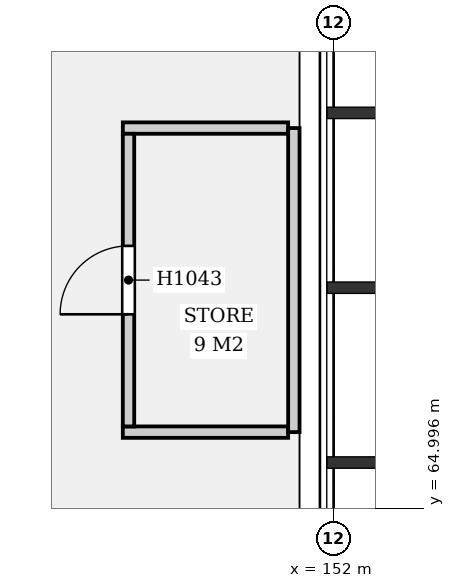
"""IFC4 building model, lengths in metres.
Left out: names, types, materials, properties, quantities, classifications, styles, units other than length and angle.
Written with IfcOpenShell. Run it as: python <this file> out.ifc"""

import sys

from ifc_helpers import new_model, si_unit, direction, frame, frame_2d, origin, place, context, subcontext, project, spatial, rectangle, extrude, element, fill, save


model = new_model("IFC4")
c1 = context("Model", 3, precision=1e-05, world=origin(), true_north=direction((0.0, 1.0)))
c2 = subcontext(c1, "Body", "Model", "MODEL_VIEW")
j1 = project(units=[si_unit("LENGTHUNIT", "METRE"), si_unit("PLANEANGLEUNIT", "RADIAN")], contexts=[c1])
p1 = place(None, origin())
s1 = spatial("IfcSite", under=j1, at=p1, CompositionType="ELEMENT")
p2 = place(p1, origin())
s2 = spatial("IfcBuilding", under=s1, at=p2, CompositionType="ELEMENT")
p3 = place(p2, frame((0.0, 0.0, 5.0)))
s3 = spatial("IfcBuildingStorey", under=s2, at=p3, CompositionType="ELEMENT", Elevation=5.0)
p4 = place(p3, frame((149.3, 66.075, 0.0), z_axis=(0.0, 0.0, 1.0), x_axis=(0.0, 1.0, 0.0)))
e1 = element("IfcWall", 1, at=p4, inside=s3, PredefinedType="PARTITIONING", context=c2, shape_type="SweptSolid", body=[
    extrude(rectangle(XDim=3.85, YDim=0.15, at=frame_2d((1.925, 0.0))), origin(), (0.0, 0.0, 1.0), 4.15),
])
p5 = place(p4, frame((1.475, 0.0, 0.0)))
e2 = element("IfcOpeningElement", 2, at=p5, cuts=e1, PredefinedType="OPENING", context=c2, shape_type="SweptSolid", body=[
    extrude(rectangle(XDim=0.9, YDim=2.1, at=frame_2d((0.45, 1.05))), frame((0.0, 0.085, 0.0), z_axis=(0.0, -1.0, 0.0), x_axis=(1.0, 0.0, 0.0)), (0.0, 0.0, 1.0), 0.17),
])
for number, where, z_axis, x_axis in (
    (3, (151.4, 66.0, 0.0), (0.0, 0.0, 1.0), (-1.0, 0.0, 0.0)),
    (4, (151.4, 70.0, 0.0), (0.0, 0.0, 1.0), (-1.0, 0.0, 0.0)),
):
    element("IfcWall", number, at=place(p3, frame(where, z_axis=z_axis, x_axis=x_axis)), inside=s3, PredefinedType="PARTITIONING", context=c2, shape_type="SweptSolid", body=[
        extrude(rectangle(XDim=2.175, YDim=0.15, at=frame_2d((1.087, 0.0))), origin(), (0.0, 0.0, 1.0), 4.15),
    ])
p6 = place(p3, frame((151.475, 66.0, 0.0), z_axis=(0.0, 0.0, 1.0), x_axis=(0.0, 1.0, 0.0)))
e5 = element("IfcWall", 5, at=p6, inside=s3, PredefinedType="PARTITIONING", context=c2, shape_type="SweptSolid", body=[
    extrude(rectangle(XDim=4.0, YDim=0.15, at=frame_2d((2.0, 0.0))), origin(), (0.0, 0.0, 1.0), 4.15),
])
p7 = place(p5, origin())
e6 = element("IfcDoor", 6, at=p7, inside=s3, OperationType="SINGLE_SWING_LEFT", PredefinedType="DOOR", context=c2, shape_type="SweptSolid", body=[
    extrude(rectangle(XDim=0.9, YDim=2.1, at=frame_2d((0.45, 1.05))), frame((0.0, 0.025, 0.0), z_axis=(0.0, -1.0, 0.0), x_axis=(1.0, 0.0, 0.0)), (0.0, 0.0, 1.0), 0.05),
])
fill(e2, e6)
save(model, sys.argv[1])
